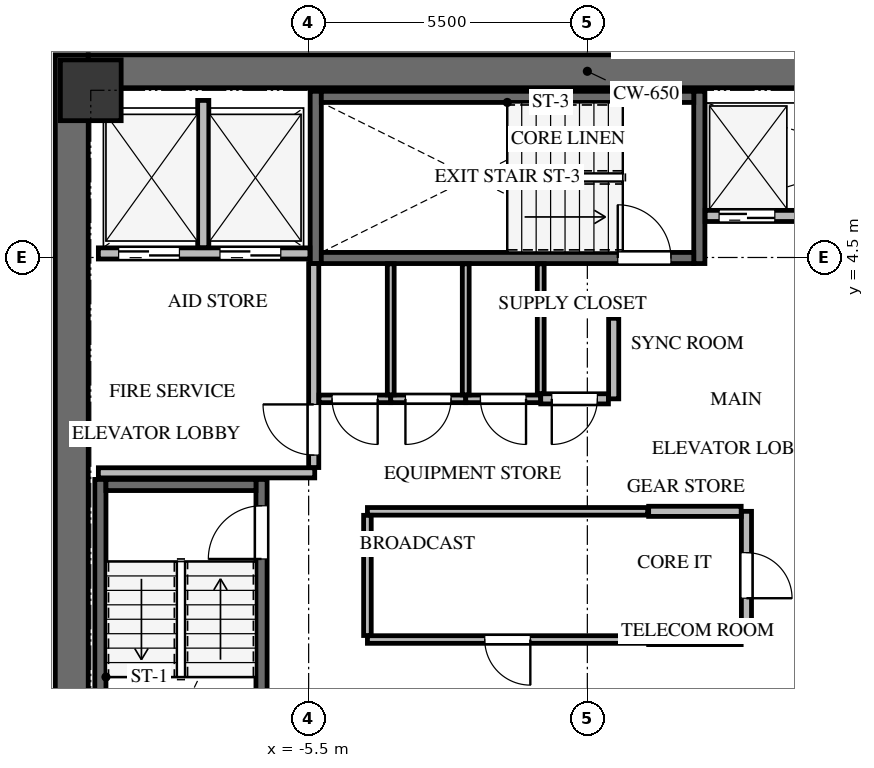
"""IFC4 building model, lengths in metres.
Left out: names, types, materials, properties, quantities, classifications, styles, units other than length and angle.
Written with IfcOpenShell. Run it as: python <this file> out.ifc"""

import sys

from ifc_helpers import new_model, si_unit, direction, frame, frame_2d, origin, origin_2d, place, context, subcontext, project, spatial, rectangle, extrude, source, transform, mapped, element, fill, save


model = new_model("IFC4")
c1 = context("Model", 3, precision=1e-05, world=origin(), true_north=direction((0.0, 1.0)))
c2 = subcontext(c1, "Body", "Model", "MODEL_VIEW")
j1 = project(units=[si_unit("LENGTHUNIT", "METRE"), si_unit("PLANEANGLEUNIT", "RADIAN")], contexts=[c1])
p1 = place(None, origin())
s1 = spatial("IfcSite", under=j1, at=p1, CompositionType="ELEMENT")
p2 = place(p1, origin())
s2 = spatial("IfcBuilding", under=s1, at=p2, CompositionType="ELEMENT")
p3 = place(p2, frame((0.0, 0.0, 206.2)))
s3 = spatial("IfcBuildingStorey", under=s2, at=p3, CompositionType="ELEMENT", Elevation=206.2)
p4 = place(p3, frame((-10.175, -8.5, 0.0), z_axis=(0.0, 0.0, 1.0), x_axis=(0.0, 1.0, 0.0)))
e1 = element("IfcWall", 1, at=p4, inside=s3, PredefinedType="SHEAR", context=c2, shape_type="SweptSolid", body=[
    extrude(rectangle(XDim=17.0, YDim=0.65, at=frame_2d((8.5, 0.0))), origin(), (0.0, 0.0, 1.0), 3.0),
])
p5 = place(p3, frame((-9.85, 8.175, 0.0), z_axis=(0.0, 0.0, 1.0), x_axis=(1.0, 0.0, 0.0)))
e2 = element("IfcWall", 2, at=p5, inside=s3, PredefinedType="SHEAR", context=c2, shape_type="SweptSolid", body=[
    extrude(rectangle(XDim=19.7, YDim=0.65, at=frame_2d((9.85, 0.0))), origin(), (0.0, 0.0, 1.0), 3.0),
])
p6 = place(p3, frame((-6.43, -7.77, -0.24), z_axis=(0.0, 0.0, 1.0), x_axis=(0.0, 1.0, 0.0)))
e3 = element("IfcWall", 3, at=p6, inside=s3, PredefinedType="SHEAR", context=c2, shape_type="SweptSolid", body=[
    extrude(rectangle(XDim=7.89, YDim=0.22, at=frame_2d((3.945, 0.0))), origin(), (0.0, 0.0, 1.0), 3.0),
])
p7 = place(p6, frame((6.32, 0.0, 0.0)))
e4 = element("IfcOpeningElement", 4, at=p7, cuts=e3, PredefinedType="OPENING", context=c2, shape_type="SweptSolid", body=[
    extrude(rectangle(XDim=1.05, YDim=2.15, at=frame_2d((0.525, 1.075))), frame((0.0, 0.12, 0.0), z_axis=(0.0, -1.0, 0.0), x_axis=(1.0, 0.0, 0.0)), (0.0, 0.0, 1.0), 0.24),
])
p8 = place(p3, frame((-9.61, 0.12, -0.24), z_axis=(0.0, 0.0, 1.0), x_axis=(0.0, -1.0, 0.0)))
e5 = element("IfcWall", 5, at=p8, inside=s3, PredefinedType="SHEAR", context=c2, shape_type="SweptSolid", body=[
    extrude(rectangle(XDim=7.89, YDim=0.22, at=frame_2d((3.945, 0.0))), origin(), (0.0, 0.0, 1.0), 3.0),
])
p9 = place(p3, frame((-6.54, 0.01, -0.24), z_axis=(0.0, 0.0, 1.0), x_axis=(-1.0, 0.0, 0.0)))
e6 = element("IfcWall", 6, at=p9, inside=s3, PredefinedType="SHEAR", context=c2, shape_type="SweptSolid", body=[
    extrude(rectangle(XDim=2.96, YDim=0.22, at=frame_2d((1.48, 0.0))), origin(), (0.0, 0.0, 1.0), 3.0),
])
for number, where, z_axis, x_axis in (
    (7, (2.21, 4.38, -0.24), (0.0, 0.0, 1.0), (0.0, 1.0, 0.0)),
    (8, (-5.36, 7.78, -0.24), (0.0, 0.0, 1.0), (0.0, -1.0, 0.0)),
):
    element("IfcWall", number, at=place(p3, frame(where, z_axis=z_axis, x_axis=x_axis)), inside=s3, PredefinedType="SHEAR", context=c2, shape_type="SweptSolid", body=[
        extrude(rectangle(XDim=3.4, YDim=0.22, at=frame_2d((1.7, 0.0))), origin(), (0.0, 0.0, 1.0), 3.0),
    ])
p10 = place(p3, frame((-5.25, 4.49, -0.24), z_axis=(0.0, 0.0, 1.0), x_axis=(1.0, 0.0, 0.0)))
e9 = element("IfcWall", 9, at=p10, inside=s3, PredefinedType="SHEAR", context=c2, shape_type="SweptSolid", body=[
    extrude(rectangle(XDim=7.35, YDim=0.22, at=frame_2d((3.675, 0.0))), origin(), (0.0, 0.0, 1.0), 3.0),
])
p11 = place(p10, frame((5.85, 0.0, 0.0)))
e10 = element("IfcOpeningElement", 10, at=p11, cuts=e9, PredefinedType="OPENING", context=c2, shape_type="SweptSolid", body=[
    extrude(rectangle(XDim=1.05, YDim=2.15, at=frame_2d((0.525, 1.075))), frame((0.0, 0.12, 0.0), z_axis=(0.0, -1.0, 0.0), x_axis=(1.0, 0.0, 0.0)), (0.0, 0.0, 1.0), 0.24),
])
p12 = place(p3, frame((2.1, 7.67, -0.24), z_axis=(0.0, 0.0, 1.0), x_axis=(-1.0, 0.0, 0.0)))
e11 = element("IfcWall", 11, at=p12, inside=s3, PredefinedType="SHEAR", context=c2, shape_type="SweptSolid", body=[
    extrude(rectangle(XDim=7.35, YDim=0.22, at=frame_2d((3.675, 0.0))), origin(), (0.0, 0.0, 1.0), 3.0),
])
m1 = source(origin(), c2, "Body", "SweptSolid", [
    extrude(rectangle(XDim=1.2, YDim=1.2, at=origin_2d()), origin(), (0.0, 0.0, 1.0), 3.0),
])
p13 = place(p3, frame((-9.8, 7.8, -0.24), z_axis=(0.0, 0.0, 1.0), x_axis=(1.0, 0.0, 0.0)))
e12 = element("IfcColumn", 12, at=p13, inside=s3, PredefinedType="COLUMN", context=c2, shape_type="MappedRepresentation", body=[
    mapped(m1, transform((0.0, 0.0, 0.0), x_axis=(1.0, 0.0, 0.0), y_axis=(0.0, 1.0, 0.0), z_axis=(0.0, 0.0, 1.0), scale=1.0)),
])
p14 = place(p3, frame((-9.65, 4.58, 0.0), z_axis=(0.0, 0.0, 1.0), x_axis=(1.0, 0.0, 0.0)))
e13 = element("IfcWall", 13, at=p14, inside=s3, PredefinedType="SOLIDWALL", context=c2, shape_type="SweptSolid", body=[
    extrude(rectangle(XDim=4.175, YDim=0.22, at=frame_2d((2.087, 0.0))), origin(), (0.0, 0.0, 1.0), 2.745),
])
p15 = place(p14, frame((0.4, 0.0, 0.0)))
e14 = element("IfcOpeningElement", 14, at=p15, cuts=e13, PredefinedType="OPENING", context=c2, shape_type="SweptSolid", body=[
    extrude(rectangle(XDim=1.2, YDim=2.15, at=frame_2d((0.6, 1.075))), frame((0.0, 0.12, 0.0), z_axis=(0.0, -1.0, 0.0), x_axis=(1.0, 0.0, 0.0)), (0.0, 0.0, 1.0), 0.24),
])
p16 = place(p14, frame((2.4, 0.0, 0.0)))
e15 = element("IfcOpeningElement", 15, at=p16, cuts=e13, PredefinedType="OPENING", context=c2, shape_type="SweptSolid", body=[
    extrude(rectangle(XDim=1.2, YDim=2.15, at=frame_2d((0.6, 1.075))), frame((0.0, 0.12, 0.0), z_axis=(0.0, -1.0, 0.0), x_axis=(1.0, 0.0, 0.0)), (0.0, 0.0, 1.0), 0.24),
])
p17 = place(p3, frame((-7.58, 4.694, 0.0), z_axis=(0.0, 0.0, 1.0), x_axis=(0.0, 1.0, 0.0)))
e16 = element("IfcWall", 16, at=p17, inside=s3, PredefinedType="SOLIDWALL", context=c2, shape_type="SweptSolid", body=[
    extrude(rectangle(XDim=2.906, YDim=0.22, at=frame_2d((1.453, 0.0))), origin(), (0.0, 0.0, 1.0), 2.745),
])
p18 = place(p3, frame((-9.65, 0.25, 0.0), z_axis=(0.0, 0.0, 1.0), x_axis=(1.0, 0.0, 0.0)))
e17 = element("IfcWall", 17, at=p18, inside=s3, PredefinedType="SOLIDWALL", context=c2, shape_type="SweptSolid", body=[
    extrude(rectangle(XDim=4.27, YDim=0.2, at=frame_2d((2.135, 0.0))), origin(), (0.0, 0.0, 1.0), 2.745),
])
p19 = place(p3, frame((-5.4, 0.354, 0.0), z_axis=(0.0, 0.0, 1.0), x_axis=(0.0, 1.0, 0.0)))
e18 = element("IfcWall", 18, at=p19, inside=s3, PredefinedType="SOLIDWALL", context=c2, shape_type="SweptSolid", body=[
    extrude(rectangle(XDim=4.026, YDim=0.2, at=frame_2d((2.013, 0.0))), origin(), (0.0, 0.0, 1.0), 2.745),
])
p20 = place(p19, frame((0.246, 0.0, 0.0)))
e19 = element("IfcOpeningElement", 19, at=p20, cuts=e18, PredefinedType="OPENING", context=c2, shape_type="SweptSolid", body=[
    extrude(rectangle(XDim=1.0, YDim=2.15, at=frame_2d((0.5, 1.075))), frame((0.0, 0.11, 0.0), z_axis=(0.0, -1.0, 0.0), x_axis=(1.0, 0.0, 0.0)), (0.0, 0.0, 1.0), 0.22),
])
p21 = place(p3, frame((2.325, 5.32, 0.0), z_axis=(0.0, 0.0, 1.0), x_axis=(1.0, 0.0, 0.0)))
e20 = element("IfcWall", 20, at=p21, inside=s3, PredefinedType="SOLIDWALL", context=c2, shape_type="SweptSolid", body=[
    extrude(rectangle(XDim=7.325, YDim=0.22, at=frame_2d((3.663, 0.0))), origin(), (0.0, 0.0, 1.0), 2.745),
])
p22 = place(p21, frame((0.275, 0.0, 0.0)))
e21 = element("IfcOpeningElement", 21, at=p22, cuts=e20, PredefinedType="OPENING", context=c2, shape_type="SweptSolid", body=[
    extrude(rectangle(XDim=1.1, YDim=2.15, at=frame_2d((0.55, 1.075))), frame((0.0, 0.12, 0.0), z_axis=(0.0, -1.0, 0.0), x_axis=(1.0, 0.0, 0.0)), (0.0, 0.0, 1.0), 0.24),
])
p23 = place(p21, frame((2.045, 0.0, 0.0)))
e22 = element("IfcOpeningElement", 22, at=p23, cuts=e20, PredefinedType="OPENING", context=c2, shape_type="SweptSolid", body=[
    extrude(rectangle(XDim=1.1, YDim=2.15, at=frame_2d((0.55, 1.075))), frame((0.0, 0.12, 0.0), z_axis=(0.0, -1.0, 0.0), x_axis=(1.0, 0.0, 0.0)), (0.0, 0.0, 1.0), 0.24),
])
p24 = place(p21, frame((3.815, 0.0, 0.0)))
e23 = element("IfcOpeningElement", 23, at=p24, cuts=e20, PredefinedType="OPENING", context=c2, shape_type="SweptSolid", body=[
    extrude(rectangle(XDim=1.1, YDim=2.15, at=frame_2d((0.55, 1.075))), frame((0.0, 0.12, 0.0), z_axis=(0.0, -1.0, 0.0), x_axis=(1.0, 0.0, 0.0)), (0.0, 0.0, 1.0), 0.24),
])
p25 = place(p21, frame((5.585, 0.0, 0.0)))
e24 = element("IfcOpeningElement", 24, at=p25, cuts=e20, PredefinedType="OPENING", context=c2, shape_type="SweptSolid", body=[
    extrude(rectangle(XDim=1.1, YDim=2.15, at=frame_2d((0.55, 1.075))), frame((0.0, 0.12, 0.0), z_axis=(0.0, -1.0, 0.0), x_axis=(1.0, 0.0, 0.0)), (0.0, 0.0, 1.0), 0.24),
])
p26 = place(p3, frame((1.19, -3.04, 0.0), z_axis=(0.0, 0.0, 1.0), x_axis=(-1.0, 0.0, 0.0)))
e25 = element("IfcWall", 25, at=p26, inside=s3, PredefinedType="PARTITIONING", context=c2, shape_type="SweptSolid", body=[
    extrude(rectangle(XDim=5.53, YDim=0.15, at=frame_2d((2.765, 0.0))), origin(), (0.0, 0.0, 1.0), 2.745),
])
p27 = place(p26, frame((2.315, 0.0, 0.0)))
e26 = element("IfcOpeningElement", 26, at=p27, cuts=e25, PredefinedType="OPENING", context=c2, shape_type="SweptSolid", body=[
    extrude(rectangle(XDim=0.9, YDim=2.05, at=frame_2d((0.45, 1.025))), frame((0.0, 0.085, 0.0), z_axis=(0.0, -1.0, 0.0), x_axis=(1.0, 0.0, 0.0)), (0.0, 0.0, 1.0), 0.17),
])
p28 = place(p3, frame((-4.34, -0.51, 0.0), z_axis=(0.0, 0.0, 1.0), x_axis=(1.0, 0.0, 0.0)))
e27 = element("IfcWall", 27, at=p28, inside=s3, PredefinedType="PARTITIONING", context=c2, shape_type="SweptSolid", body=[
    extrude(rectangle(XDim=5.53, YDim=0.15, at=frame_2d((2.765, 0.0))), origin(), (0.0, 0.0, 1.0), 2.745),
])
p29 = place(p3, frame((-4.34, -2.961, 0.0), z_axis=(0.0, 0.0, 1.0), x_axis=(0.0, 1.0, 0.0)))
e28 = element("IfcWall", 28, at=p29, inside=s3, PredefinedType="PARTITIONING", context=c2, shape_type="SweptSolid", body=[
    extrude(rectangle(XDim=2.372, YDim=0.15, at=frame_2d((1.186, 0.0))), origin(), (0.0, 0.0, 1.0), 2.745),
])
p30 = place(p3, frame((3.14, -0.51, 0.0), z_axis=(0.0, 0.0, 1.0), x_axis=(0.0, -1.0, 0.0)))
e29 = element("IfcWall", 29, at=p30, inside=s3, PredefinedType="SOLIDWALL", context=c2, shape_type="SweptSolid", body=[
    extrude(rectangle(XDim=2.53, YDim=0.2, at=frame_2d((1.265, 0.0))), origin(), (0.0, 0.0, 1.0), 2.745),
])
p31 = place(p30, frame((0.815, 0.0, 0.0)))
e30 = element("IfcOpeningElement", 30, at=p31, cuts=e29, PredefinedType="OPENING", context=c2, shape_type="SweptSolid", body=[
    extrude(rectangle(XDim=0.9, YDim=2.05, at=frame_2d((0.45, 1.025))), frame((0.0, 0.11, 0.0), z_axis=(0.0, -1.0, 0.0), x_axis=(1.0, 0.0, 0.0)), (0.0, 0.0, 1.0), 0.22),
])
for number, where, z_axis, x_axis in (
    (31, (3.036, -3.04, 0.0), (0.0, 0.0, 1.0), (-1.0, 0.0, 0.0)),
    (32, (1.21, -0.51, 0.0), (0.0, 0.0, 1.0), (1.0, 0.0, 0.0)),
):
    element("IfcWall", number, at=place(p3, frame(where, z_axis=z_axis, x_axis=x_axis)), inside=s3, PredefinedType="SOLIDWALL", context=c2, shape_type="SweptSolid", body=[
        extrude(rectangle(XDim=1.826, YDim=0.2, at=frame_2d((0.913, 0.0))), origin(), (0.0, 0.0, 1.0), 2.745),
    ])
p32 = place(p3, frame((-3.88, 1.71, 0.0), z_axis=(0.0, 0.0, 1.0), x_axis=(-1.0, 0.0, 0.0)))
e33 = element("IfcWall", 33, at=p32, inside=s3, PredefinedType="PARTITIONING", context=c2, shape_type="SweptSolid", body=[
    extrude(rectangle(XDim=1.416, YDim=0.15, at=frame_2d((0.708, 0.0))), origin(), (0.0, 0.0, 1.0), 2.745),
])
p33 = place(p32, frame((0.258, 0.0, 0.0)))
e34 = element("IfcOpeningElement", 34, at=p33, cuts=e33, PredefinedType="OPENING", context=c2, shape_type="SweptSolid", body=[
    extrude(rectangle(XDim=0.9, YDim=2.05, at=frame_2d((0.45, 1.025))), frame((0.0, 0.085, 0.0), z_axis=(0.0, -1.0, 0.0), x_axis=(1.0, 0.0, 0.0)), (0.0, 0.0, 1.0), 0.17),
])
p34 = place(p3, frame((-2.4, 1.71, 0.0), z_axis=(0.0, 0.0, 1.0), x_axis=(-1.0, 0.0, 0.0)))
e35 = element("IfcWall", 35, at=p34, inside=s3, PredefinedType="PARTITIONING", context=c2, shape_type="SweptSolid", body=[
    extrude(rectangle(XDim=1.48, YDim=0.15, at=frame_2d((0.74, 0.0))), origin(), (0.0, 0.0, 1.0), 2.745),
])
p35 = place(p34, frame((0.29, 0.0, 0.0)))
e36 = element("IfcOpeningElement", 36, at=p35, cuts=e35, PredefinedType="OPENING", context=c2, shape_type="SweptSolid", body=[
    extrude(rectangle(XDim=0.9, YDim=2.05, at=frame_2d((0.45, 1.025))), frame((0.0, 0.085, 0.0), z_axis=(0.0, -1.0, 0.0), x_axis=(1.0, 0.0, 0.0)), (0.0, 0.0, 1.0), 0.17),
])
p36 = place(p3, frame((-0.92, 1.71, 0.0), z_axis=(0.0, 0.0, 1.0), x_axis=(-1.0, 0.0, 0.0)))
e37 = element("IfcWall", 37, at=p36, inside=s3, PredefinedType="PARTITIONING", context=c2, shape_type="SweptSolid", body=[
    extrude(rectangle(XDim=1.48, YDim=0.15, at=frame_2d((0.74, 0.0))), origin(), (0.0, 0.0, 1.0), 2.745),
])
p37 = place(p36, frame((0.29, 0.0, 0.0)))
e38 = element("IfcOpeningElement", 38, at=p37, cuts=e37, PredefinedType="OPENING", context=c2, shape_type="SweptSolid", body=[
    extrude(rectangle(XDim=0.9, YDim=2.05, at=frame_2d((0.45, 1.025))), frame((0.0, 0.085, 0.0), z_axis=(0.0, -1.0, 0.0), x_axis=(1.0, 0.0, 0.0)), (0.0, 0.0, 1.0), 0.17),
])
p38 = place(p3, frame((0.52, 3.3, 0.0), z_axis=(0.0, 0.0, 1.0), x_axis=(0.0, -1.0, 0.0)))
e39 = element("IfcWall", 39, at=p38, inside=s3, PredefinedType="SOLIDWALL", context=c2, shape_type="SweptSolid", body=[
    extrude(rectangle(XDim=1.59, YDim=0.2, at=frame_2d((0.795, 0.0))), origin(), (0.0, 0.0, 1.0), 2.745),
])
p39 = place(p3, frame((0.416, 1.71, 0.0), z_axis=(0.0, 0.0, 1.0), x_axis=(-1.0, 0.0, 0.0)))
e40 = element("IfcWall", 40, at=p39, inside=s3, PredefinedType="SOLIDWALL", context=c2, shape_type="SweptSolid", body=[
    extrude(rectangle(XDim=1.336, YDim=0.2, at=frame_2d((0.668, 0.0))), origin(), (0.0, 0.0, 1.0), 2.745),
])
p40 = place(p39, frame((0.218, 0.0, 0.0)))
e41 = element("IfcOpeningElement", 41, at=p40, cuts=e40, PredefinedType="OPENING", context=c2, shape_type="SweptSolid", body=[
    extrude(rectangle(XDim=0.9, YDim=2.05, at=frame_2d((0.45, 1.025))), frame((0.0, 0.11, 0.0), z_axis=(0.0, -1.0, 0.0), x_axis=(1.0, 0.0, 0.0)), (0.0, 0.0, 1.0), 0.22),
])
for number, where, z_axis, x_axis in (
    (42, (-3.88, 4.375, 0.0), (0.0, 0.0, 1.0), (0.0, -1.0, 0.0)),
    (43, (-2.4, 4.375, 0.0), (0.0, 0.0, 1.0), (0.0, -1.0, 0.0)),
):
    element("IfcWall", number, at=place(p3, frame(where, z_axis=z_axis, x_axis=x_axis)), inside=s3, PredefinedType="PARTITIONING", context=c2, shape_type="SweptSolid", body=[
        extrude(rectangle(XDim=2.586, YDim=0.135, at=frame_2d((1.293, 0.0))), origin(), (0.0, 0.0, 1.0), 2.745),
    ])
p41 = place(p3, frame((-0.92, 4.375, 0.0), z_axis=(0.0, 0.0, 1.0), x_axis=(0.0, -1.0, 0.0)))
e44 = element("IfcWall", 44, at=p41, inside=s3, PredefinedType="PARTITIONING", context=c2, shape_type="SweptSolid", body=[
    extrude(rectangle(XDim=2.561, YDim=0.135, at=frame_2d((1.281, 0.0))), origin(), (0.0, 0.0, 1.0), 2.745),
])
m2 = source(origin(), c2, "Body", "SweptSolid", [
    extrude(rectangle(XDim=1.05, YDim=2.15, at=frame_2d((0.525, 1.075))), frame((0.0, 0.025, 0.0), z_axis=(0.0, -1.0, 0.0), x_axis=(1.0, 0.0, 0.0)), (0.0, 0.0, 1.0), 0.05),
])
p42 = place(p7, origin())
e45 = element("IfcDoor", 45, at=p42, inside=s3, OperationType="SINGLE_SWING_LEFT", PredefinedType="DOOR", context=c2, shape_type="MappedRepresentation", body=[
    mapped(m2, transform((0.0, 0.0, 0.0), x_axis=(1.0, 0.0, 0.0), y_axis=(0.0, 1.0, 0.0), z_axis=(0.0, 0.0, 1.0), scale=1.0)),
])
fill(e4, e45)
p43 = place(p11, origin())
e46 = element("IfcDoor", 46, at=p43, inside=s3, OperationType="SINGLE_SWING_LEFT", PredefinedType="DOOR", context=c2, shape_type="MappedRepresentation", body=[
    mapped(m2, transform((0.0, 0.0, 0.0), x_axis=(1.0, 0.0, 0.0), y_axis=(0.0, 1.0, 0.0), z_axis=(0.0, 0.0, 1.0), scale=1.0)),
])
fill(e10, e46)
m3 = source(origin(), c2, "Body", "SweptSolid", [
    extrude(rectangle(XDim=1.2, YDim=2.15, at=frame_2d((0.6, 1.075))), frame((0.0, 0.025, 0.0), z_axis=(0.0, -1.0, 0.0), x_axis=(1.0, 0.0, 0.0)), (0.0, 0.0, 1.0), 0.05),
])
p44 = place(p15, origin())
e47 = element("IfcDoor", 47, at=p44, inside=s3, OperationType="DOUBLE_DOOR_SLIDING", PredefinedType="DOOR", context=c2, shape_type="MappedRepresentation", body=[
    mapped(m3, transform((0.0, 0.0, 0.0), x_axis=(1.0, 0.0, 0.0), y_axis=(0.0, 1.0, 0.0), z_axis=(0.0, 0.0, 1.0), scale=1.0)),
])
fill(e14, e47)
p45 = place(p16, origin())
e48 = element("IfcDoor", 48, at=p45, inside=s3, OperationType="DOUBLE_DOOR_SLIDING", PredefinedType="DOOR", context=c2, shape_type="MappedRepresentation", body=[
    mapped(m3, transform((0.0, 0.0, 0.0), x_axis=(1.0, 0.0, 0.0), y_axis=(0.0, 1.0, 0.0), z_axis=(0.0, 0.0, 1.0), scale=1.0)),
])
fill(e15, e48)
m4 = source(origin(), c2, "Body", "SweptSolid", [
    extrude(rectangle(XDim=1.0, YDim=2.15, at=frame_2d((0.5, 1.075))), frame((0.0, 0.025, 0.0), z_axis=(0.0, -1.0, 0.0), x_axis=(1.0, 0.0, 0.0)), (0.0, 0.0, 1.0), 0.05),
])
p46 = place(p20, origin())
e49 = element("IfcDoor", 49, at=p46, inside=s3, OperationType="SINGLE_SWING_RIGHT", PredefinedType="DOOR", context=c2, shape_type="MappedRepresentation", body=[
    mapped(m4, transform((0.0, 0.0, 0.0), x_axis=(1.0, 0.0, 0.0), y_axis=(0.0, 1.0, 0.0), z_axis=(0.0, 0.0, 1.0), scale=1.0)),
])
fill(e19, e49)
m5 = source(origin(), c2, "Body", "SweptSolid", [
    extrude(rectangle(XDim=1.1, YDim=2.15, at=frame_2d((0.55, 1.075))), frame((0.0, 0.025, 0.0), z_axis=(0.0, -1.0, 0.0), x_axis=(1.0, 0.0, 0.0)), (0.0, 0.0, 1.0), 0.05),
])
p47 = place(p22, origin())
e50 = element("IfcDoor", 50, at=p47, inside=s3, OperationType="DOUBLE_DOOR_SLIDING", PredefinedType="DOOR", context=c2, shape_type="MappedRepresentation", body=[
    mapped(m5, transform((0.0, 0.0, 0.0), x_axis=(1.0, 0.0, 0.0), y_axis=(0.0, 1.0, 0.0), z_axis=(0.0, 0.0, 1.0), scale=1.0)),
])
fill(e21, e50)
m6 = source(origin(), c2, "Body", "SweptSolid", [
    extrude(rectangle(XDim=0.9, YDim=2.05, at=frame_2d((0.45, 1.025))), frame((0.0, 0.025, 0.0), z_axis=(0.0, -1.0, 0.0), x_axis=(1.0, 0.0, 0.0)), (0.0, 0.0, 1.0), 0.05),
])
p48 = place(p27, origin())
e51 = element("IfcDoor", 51, at=p48, inside=s3, OperationType="SINGLE_SWING_LEFT", PredefinedType="DOOR", context=c2, shape_type="MappedRepresentation", body=[
    mapped(m6, transform((0.0, 0.0, 0.0), x_axis=(1.0, 0.0, 0.0), y_axis=(0.0, 1.0, 0.0), z_axis=(0.0, 0.0, 1.0), scale=1.0)),
])
fill(e26, e51)
m7 = source(origin(), c2, "Body", "SweptSolid", [
    extrude(rectangle(XDim=0.9, YDim=2.05, at=frame_2d((0.45, 1.025))), frame((0.0, 0.025, 0.0), z_axis=(0.0, -1.0, 0.0), x_axis=(1.0, 0.0, 0.0)), (0.0, 0.0, 1.0), 0.05),
])
p49 = place(p31, origin())
e52 = element("IfcDoor", 52, at=p49, inside=s3, OperationType="SINGLE_SWING_RIGHT", PredefinedType="DOOR", context=c2, shape_type="MappedRepresentation", body=[
    mapped(m7, transform((0.0, 0.0, 0.0), x_axis=(1.0, 0.0, 0.0), y_axis=(0.0, 1.0, 0.0), z_axis=(0.0, 0.0, 1.0), scale=1.0)),
])
fill(e30, e52)
p50 = place(p33, origin())
e53 = element("IfcDoor", 53, at=p50, inside=s3, OperationType="SINGLE_SWING_LEFT", PredefinedType="DOOR", context=c2, shape_type="MappedRepresentation", body=[
    mapped(m6, transform((0.0, 0.0, 0.0), x_axis=(1.0, 0.0, 0.0), y_axis=(0.0, 1.0, 0.0), z_axis=(0.0, 0.0, 1.0), scale=1.0)),
])
fill(e34, e53)
p51 = place(p35, origin())
e54 = element("IfcDoor", 54, at=p51, inside=s3, OperationType="SINGLE_SWING_RIGHT", PredefinedType="DOOR", context=c2, shape_type="MappedRepresentation", body=[
    mapped(m7, transform((0.0, 0.0, 0.0), x_axis=(1.0, 0.0, 0.0), y_axis=(0.0, 1.0, 0.0), z_axis=(0.0, 0.0, 1.0), scale=1.0)),
])
fill(e36, e54)
p52 = place(p37, origin())
e55 = element("IfcDoor", 55, at=p52, inside=s3, OperationType="SINGLE_SWING_LEFT", PredefinedType="DOOR", context=c2, shape_type="MappedRepresentation", body=[
    mapped(m6, transform((0.0, 0.0, 0.0), x_axis=(1.0, 0.0, 0.0), y_axis=(0.0, 1.0, 0.0), z_axis=(0.0, 0.0, 1.0), scale=1.0)),
])
fill(e38, e55)
p53 = place(p40, origin())
e56 = element("IfcDoor", 56, at=p53, inside=s3, OperationType="SINGLE_SWING_RIGHT", PredefinedType="DOOR", context=c2, shape_type="MappedRepresentation", body=[
    mapped(m7, transform((0.0, 0.0, 0.0), x_axis=(1.0, 0.0, 0.0), y_axis=(0.0, 1.0, 0.0), z_axis=(0.0, 0.0, 1.0), scale=1.0)),
])
fill(e41, e56)
save(model, sys.argv[1])
